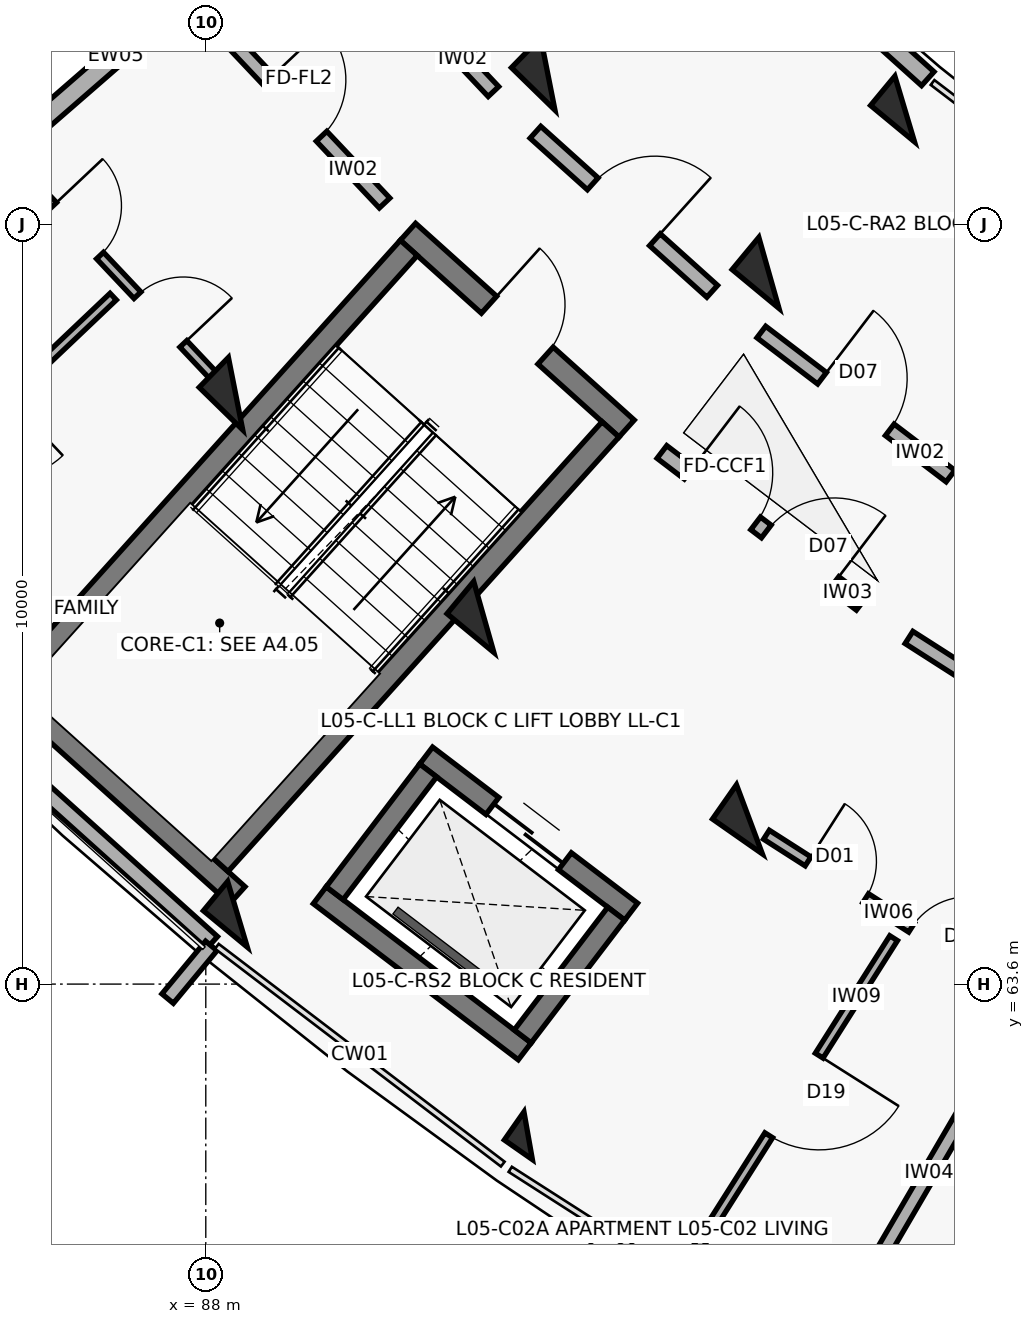
"""IFC4 building model, lengths in metres.
Left out: names, types, materials, properties, quantities, classifications, styles, units other than length and angle.
Written with IfcOpenShell. Run it as: python <this file> out.ifc"""

import sys

from ifc_helpers import new_model, si_unit, direction, frame, frame_2d, origin, origin_2d, place, context, subcontext, project, spatial, rectangle, extrude, element, fill, save


model = new_model("IFC4")
c1 = context("Model", 3, precision=1e-05, world=origin(), true_north=direction((0.0, 1.0)))
c2 = subcontext(c1, "Body", "Model", "MODEL_VIEW")
j1 = project(units=[si_unit("LENGTHUNIT", "METRE"), si_unit("PLANEANGLEUNIT", "RADIAN")], contexts=[c1])
p1 = place(None, origin())
s1 = spatial("IfcSite", under=j1, at=p1, CompositionType="ELEMENT")
p2 = place(p1, origin())
s2 = spatial("IfcBuilding", under=s1, at=p2, CompositionType="ELEMENT")
p3 = place(p2, frame((0.0, 0.0, 17.4)))
s3 = spatial("IfcBuildingStorey", under=s2, at=p3, CompositionType="ELEMENT", Elevation=17.4)
for number, where, z_axis, x_axis in (
    (1, (92.5, 75.576, 0.0), (0.0, 0.0, 1.0), (-0.699, -0.715, 0.0)),
    (2, (88.392, 71.369, 0.0), (0.0, 0.0, 1.0), (-0.699, -0.715, 0.0)),
):
    element("IfcColumn", number, at=place(p3, frame(where, z_axis=z_axis, x_axis=x_axis)), inside=s3, PredefinedType="COLUMN", context=c2, shape_type="SweptSolid", body=[
        extrude(rectangle(XDim=0.55, YDim=0.8, at=origin_2d()), origin(), (0.0, 0.0, 1.0), 3.1),
    ])
p4 = place(p3, frame((97.195, 75.115, 0.0), z_axis=(0.0, 0.0, 1.0), x_axis=(-0.637961754089, -0.770068049148, 0.0)))
e3 = element("IfcColumn", 3, at=p4, inside=s3, PredefinedType="COLUMN", context=c2, shape_type="SweptSolid", body=[
    extrude(rectangle(XDim=0.5, YDim=0.75, at=origin_2d()), origin(), (0.0, 0.0, 1.0), 3.1),
])
for number, where, z_axis, x_axis in (
    (4, (95.409, 72.958, 0.0), (0.0, 0.0, 1.0), (-0.638, -0.77, 0.0)),
    (5, (91.658, 68.43, 0.0), (0.0, 0.0, 1.0), (-0.638, -0.77, 0.0)),
):
    element("IfcColumn", number, at=place(p3, frame(where, z_axis=z_axis, x_axis=x_axis)), inside=s3, PredefinedType="COLUMN", context=c2, shape_type="SweptSolid", body=[
        extrude(rectangle(XDim=0.55, YDim=0.8, at=origin_2d()), origin(), (0.0, 0.0, 1.0), 3.1),
    ])
p5 = place(p3, frame((88.417, 64.518, 0.0), z_axis=(0.0, 0.0, 1.0), x_axis=(-0.637961754089, -0.770068049148, 0.0)))
e6 = element("IfcColumn", 6, at=p5, inside=s3, PredefinedType="COLUMN", context=c2, shape_type="SweptSolid", body=[
    extrude(rectangle(XDim=0.5, YDim=0.75, at=origin_2d()), origin(), (0.0, 0.0, 1.0), 3.1),
])
p6 = place(p3, frame((95.152, 65.768, 0.0), z_axis=(0.0, 0.0, 1.0), x_axis=(-0.573004420611, -0.819552276527, 0.0)))
e7 = element("IfcColumn", 7, at=p6, inside=s3, PredefinedType="COLUMN", context=c2, shape_type="SweptSolid", body=[
    extrude(rectangle(XDim=0.55, YDim=0.8, at=origin_2d()), origin(), (0.0, 0.0, 1.0), 3.1),
])
p7 = place(p3, frame((92.241, 61.605, 0.0), z_axis=(0.0, 0.0, 1.0), x_axis=(-0.573004420611, -0.819552276527, 0.0)))
e8 = element("IfcColumn", 8, at=p7, inside=s3, PredefinedType="COLUMN", context=c2, shape_type="SweptSolid", body=[
    extrude(rectangle(XDim=0.45, YDim=0.45, at=origin_2d()), origin(), (0.0, 0.0, 1.0), 3.1),
])
p8 = place(p3, frame((84.508, 67.363, 0.0), z_axis=(0.0, 0.0, 1.0), x_axis=(0.743387539862, -0.668860946369, 0.0)))
e9 = element("IfcWall", 9, at=p8, inside=s3, PredefinedType="SOLIDWALL", context=c2, shape_type="SweptSolid", body=[
    extrude(rectangle(XDim=4.809, YDim=0.212, at=frame_2d((2.405, 0.0))), origin(), (0.0, 0.0, 1.0), 2.25),
])
p9 = place(p3, frame((94.82, 77.923, 0.0), z_axis=(0.0, 0.0, 1.0), x_axis=(0.743385092197, -0.668863666751, 0.0)))
e10 = element("IfcWall", 10, at=p9, inside=s3, PredefinedType="SOLIDWALL", context=c2, shape_type="SweptSolid", body=[
    extrude(rectangle(XDim=3.604, YDim=0.245, at=frame_2d((1.802, 0.0))), origin(), (0.0, 0.0, 1.0), 2.25),
])
p10 = place(p9, frame((1.002, 0.0, 0.32)))
e11 = element("IfcOpeningElement", 11, at=p10, cuts=e10, PredefinedType="OPENING", context=c2, shape_type="SweptSolid", body=[
    extrude(rectangle(XDim=1.6, YDim=1.5, at=frame_2d((0.8, 0.75))), frame((0.0, 0.133, 0.0), z_axis=(0.0, -1.0, 0.0), x_axis=(1.0, 0.0, 0.0)), (0.0, 0.0, 1.0), 0.265),
])
p11 = place(p3, frame((88.072, 64.103, 0.0), z_axis=(0.0, 0.0, 1.0), x_axis=(-0.637967316825, -0.770063440674, 0.0)))
e12 = element("IfcWall", 12, at=p11, inside=s3, PredefinedType="PARAPET", context=c2, shape_type="SweptSolid", body=[
    extrude(rectangle(XDim=0.9, YDim=0.195, at=frame_2d((0.45, 0.0))), origin(), (0.0, 0.0, 1.0), 2.25),
])
p12 = place(p3, frame((91.746, 80.101, 0.0), z_axis=(0.0, 0.0, 1.0), x_axis=(-0.754704866158, -0.656064451862, 0.0)))
e13 = element("IfcWall", 13, at=p12, inside=s3, PredefinedType="SOLIDWALL", context=c2, shape_type="SweptSolid", body=[
    extrude(rectangle(XDim=8.2, YDim=0.265, at=frame_2d((4.1, 0.0))), origin(), (0.0, 0.0, 1.0), 2.18),
])
p13 = place(p12, frame((3.59, 0.0, 0.75)))
e14 = element("IfcOpeningElement", 14, at=p13, cuts=e13, PredefinedType="OPENING", context=c2, shape_type="SweptSolid", body=[
    extrude(rectangle(XDim=1.35, YDim=1.35, at=frame_2d((0.675, 0.675))), frame((0.0, 0.142, 0.0), z_axis=(0.0, -1.0, 0.0), x_axis=(1.0, 0.0, 0.0)), (0.0, 0.0, 1.0), 0.285),
])
p14 = place(p3, frame((90.66, 73.499, 0.0), z_axis=(0.0, 0.0, 1.0), x_axis=(0.743375696158, -0.668874109501, 0.0)))
e15 = element("IfcWall", 15, at=p14, inside=s3, PredefinedType="SHEAR", context=c2, shape_type="SweptSolid", body=[
    extrude(rectangle(XDim=3.87, YDim=0.3, at=frame_2d((1.935, 0.0))), origin(), (0.0, 0.0, 1.0), 3.1),
])
p15 = place(p14, frame((1.435, 0.0, 0.0)))
e16 = element("IfcOpeningElement", 16, at=p15, cuts=e15, PredefinedType="OPENING", context=c2, shape_type="SweptSolid", body=[
    extrude(rectangle(XDim=1.0, YDim=2.15, at=frame_2d((0.5, 1.075))), frame((0.0, 0.16, 0.0), z_axis=(0.0, -1.0, 0.0), x_axis=(1.0, 0.0, 0.0)), (0.0, 0.0, 1.0), 0.32),
])
p16 = place(p3, frame((85.093, 67.76, 0.0), z_axis=(0.0, 0.0, 1.0), x_axis=(0.743372896184, -0.668877221333, 0.0)))
e17 = element("IfcWall", 17, at=p16, inside=s3, PredefinedType="SHEAR", context=c2, shape_type="SweptSolid", body=[
    extrude(rectangle(XDim=4.47, YDim=0.3, at=frame_2d((2.235, 0.0))), origin(), (0.0, 0.0, 1.0), 3.1),
])
p17 = place(p3, frame((90.671, 73.287, 0.0), z_axis=(0.0, 0.0, 1.0), x_axis=(-0.668885797871, -0.743365179038, 0.0)))
e18 = element("IfcWall", 18, at=p17, inside=s3, PredefinedType="SHEAR", context=c2, shape_type="SweptSolid", body=[
    extrude(rectangle(XDim=7.69, YDim=0.3, at=frame_2d((3.845, 0.0))), origin(), (0.0, 0.0, 1.0), 3.1),
])
p18 = place(p3, frame((93.325, 70.899, 0.0), z_axis=(0.0, 0.0, 1.0), x_axis=(-0.668868253964, -0.743380964808, 0.0)))
e19 = element("IfcWall", 19, at=p18, inside=s3, PredefinedType="SHEAR", context=c2, shape_type="SweptSolid", body=[
    extrude(rectangle(XDim=7.69, YDim=0.3, at=frame_2d((3.845, 0.0))), origin(), (0.0, 0.0, 1.0), 3.1),
])
p19 = place(p3, frame((90.899, 66.607, 0.0), z_axis=(0.0, 0.0, 1.0), x_axis=(0.795439986025, -0.606032365994, 0.0)))
e20 = element("IfcWall", 20, at=p19, inside=s3, PredefinedType="SHEAR", context=c2, shape_type="SweptSolid", body=[
    extrude(rectangle(XDim=3.39, YDim=0.28, at=frame_2d((1.695, 0.0))), origin(), (0.0, 0.0, 1.0), 3.1),
])
p20 = place(p19, frame((1.095, 0.0, 0.0)))
e21 = element("IfcOpeningElement", 21, at=p20, cuts=e20, PredefinedType="OPENING", context=c2, shape_type="SweptSolid", body=[
    extrude(rectangle(XDim=1.2, YDim=2.15, at=frame_2d((0.6, 1.075))), frame((0.0, 0.15, 0.0), z_axis=(0.0, -1.0, 0.0), x_axis=(1.0, 0.0, 0.0)), (0.0, 0.0, 1.0), 0.3),
])
p21 = place(p3, frame((89.5, 64.77, 0.0), z_axis=(0.0, 0.0, 1.0), x_axis=(0.795474703455, -0.605986795371, 0.0)))
e22 = element("IfcWall", 22, at=p21, inside=s3, PredefinedType="SHEAR", context=c2, shape_type="SweptSolid", body=[
    extrude(rectangle(XDim=3.39, YDim=0.28, at=frame_2d((1.695, 0.0))), origin(), (0.0, 0.0, 1.0), 3.1),
])
p22 = place(p3, frame((90.926, 66.411, 0.0), z_axis=(0.0, 0.0, 1.0), x_axis=(-0.605948992168, -0.795503500238, 0.0)))
e23 = element("IfcWall", 23, at=p22, inside=s3, PredefinedType="SHEAR", context=c2, shape_type="SweptSolid", body=[
    extrude(rectangle(XDim=2.03, YDim=0.28, at=frame_2d((1.015, 0.0))), origin(), (0.0, 0.0, 1.0), 3.1),
])
p23 = place(p3, frame((93.4, 64.526, 0.0), z_axis=(0.0, 0.0, 1.0), x_axis=(-0.605891019062, -0.795547656033, 0.0)))
e24 = element("IfcWall", 24, at=p23, inside=s3, PredefinedType="SHEAR", context=c2, shape_type="SweptSolid", body=[
    extrude(rectangle(XDim=2.03, YDim=0.28, at=frame_2d((1.015, 0.0))), origin(), (0.0, 0.0, 1.0), 3.1),
])
p24 = place(p3, frame((87.994, 76.376, 0.0), z_axis=(0.0, 0.0, 1.0), x_axis=(0.686310507227, -0.727308660522, 0.0)))
e25 = element("IfcWall", 25, at=p24, inside=s3, PredefinedType="SOLIDWALL", context=c2, shape_type="SweptSolid", body=[
    extrude(rectangle(XDim=3.436, YDim=0.19, at=frame_2d((1.718, 0.0))), origin(), (0.0, 0.0, 1.0), 2.08),
])
p25 = place(p24, frame((1.208, 0.0, 0.0)))
e26 = element("IfcOpeningElement", 26, at=p25, cuts=e25, PredefinedType="OPENING", context=c2, shape_type="SweptSolid", body=[
    extrude(rectangle(XDim=1.02, YDim=2.15, at=frame_2d((0.51, 1.075))), frame((0.0, 0.105, 0.0), z_axis=(0.0, -1.0, 0.0), x_axis=(1.0, 0.0, 0.0)), (0.0, 0.0, 1.0), 0.21),
])
p26 = place(p3, frame((89.541, 77.721, 0.0), z_axis=(0.0, 0.0, 1.0), x_axis=(0.686344941052, -0.727276166179, 0.0)))
e27 = element("IfcWall", 27, at=p26, inside=s3, PredefinedType="SOLIDWALL", context=c2, shape_type="SweptSolid", body=[
    extrude(rectangle(XDim=3.269, YDim=0.19, at=frame_2d((1.634, 0.0))), origin(), (0.0, 0.0, 1.0), 2.08),
])
p27 = place(p26, frame((1.174, 0.0, 0.0)))
e28 = element("IfcOpeningElement", 28, at=p27, cuts=e27, PredefinedType="OPENING", context=c2, shape_type="SweptSolid", body=[
    extrude(rectangle(XDim=0.92, YDim=2.1, at=frame_2d((0.46, 1.05))), frame((0.0, 0.105, 0.0), z_axis=(0.0, -1.0, 0.0), x_axis=(1.0, 0.0, 0.0)), (0.0, 0.0, 1.0), 0.21),
])
p28 = place(p3, frame((85.545, 74.313, 0.0), z_axis=(0.0, 0.0, 1.0), x_axis=(0.686332741542, -0.727287678906, 0.0)))
e29 = element("IfcWall", 29, at=p28, inside=s3, PredefinedType="PARTITIONING", context=c2, shape_type="SweptSolid", body=[
    extrude(rectangle(XDim=3.797, YDim=0.125, at=frame_2d((1.899, 0.0))), origin(), (0.0, 0.0, 1.0), 2.08),
])
p29 = place(p28, frame((0.65, 0.0, 0.0)))
e30 = element("IfcOpeningElement", 30, at=p29, cuts=e29, PredefinedType="OPENING", context=c2, shape_type="SweptSolid", body=[
    extrude(rectangle(XDim=0.9, YDim=2.1, at=frame_2d((0.45, 1.05))), frame((0.0, 0.073, 0.0), z_axis=(0.0, -1.0, 0.0), x_axis=(1.0, 0.0, 0.0)), (0.0, 0.0, 1.0), 0.145),
])
p30 = place(p28, frame((2.267, 0.0, 0.0)))
e31 = element("IfcOpeningElement", 31, at=p30, cuts=e29, PredefinedType="OPENING", context=c2, shape_type="SweptSolid", body=[
    extrude(rectangle(XDim=0.88, YDim=2.1, at=frame_2d((0.44, 1.05))), frame((0.0, 0.073, 0.0), z_axis=(0.0, -1.0, 0.0), x_axis=(1.0, 0.0, 0.0)), (0.0, 0.0, 1.0), 0.145),
])
p31 = place(p3, frame((86.782, 72.646, 0.0), z_axis=(0.0, 0.0, 1.0), x_axis=(-0.725204659953, -0.688533369694, 0.0)))
e32 = element("IfcWall", 32, at=p31, inside=s3, PredefinedType="PARTITIONING", context=c2, shape_type="SweptSolid", body=[
    extrude(rectangle(XDim=4.9, YDim=0.12, at=frame_2d((2.45, 0.0))), origin(), (0.0, 0.0, 1.0), 2.08),
])
p32 = place(p31, frame((1.92, 0.0, 0.0)))
e33 = element("IfcOpeningElement", 33, at=p32, cuts=e32, PredefinedType="OPENING", context=c2, shape_type="SweptSolid", body=[
    extrude(rectangle(XDim=1.06, YDim=2.1, at=frame_2d((0.53, 1.05))), frame((0.0, 0.07, 0.0), z_axis=(0.0, -1.0, 0.0), x_axis=(1.0, 0.0, 0.0)), (0.0, 0.0, 1.0), 0.14),
])
p33 = place(p3, frame((92.337, 74.808, 0.0), z_axis=(0.0, 0.0, 1.0), x_axis=(0.743348465558, -0.668904371904, 0.0)))
e34 = element("IfcWall", 34, at=p33, inside=s3, PredefinedType="SOLIDWALL", context=c2, shape_type="SweptSolid", body=[
    extrude(rectangle(XDim=3.129, YDim=0.21, at=frame_2d((1.564, 0.0))), origin(), (0.0, 0.0, 1.0), 2.08),
])
p34 = place(p33, frame((1.014, 0.0, 0.0)))
e35 = element("IfcOpeningElement", 35, at=p34, cuts=e34, PredefinedType="OPENING", context=c2, shape_type="SweptSolid", body=[
    extrude(rectangle(XDim=1.1, YDim=2.15, at=frame_2d((0.55, 1.075))), frame((0.0, 0.115, 0.0), z_axis=(0.0, -1.0, 0.0), x_axis=(1.0, 0.0, 0.0)), (0.0, 0.0, 1.0), 0.23),
])
p35 = place(p3, frame((94.001, 70.602, 0.0), z_axis=(0.0, 0.0, 1.0), x_axis=(0.795498026433, -0.605956178235, 0.0)))
e36 = element("IfcWall", 36, at=p35, inside=s3, PredefinedType="SOLIDWALL", context=c2, shape_type="SweptSolid", body=[
    extrude(rectangle(XDim=3.296, YDim=0.21, at=frame_2d((1.648, 0.0))), origin(), (0.0, 0.0, 1.0), 2.08),
])
p36 = place(p35, frame((0.45, 0.0, 0.0)))
e37 = element("IfcOpeningElement", 37, at=p36, cuts=e36, PredefinedType="OPENING", context=c2, shape_type="SweptSolid", body=[
    extrude(rectangle(XDim=1.1, YDim=2.15, at=frame_2d((0.55, 1.075))), frame((0.0, 0.115, 0.0), z_axis=(0.0, -1.0, 0.0), x_axis=(1.0, 0.0, 0.0)), (0.0, 0.0, 1.0), 0.23),
])
p37 = place(p35, frame((1.726, 0.0, 0.0)))
e38 = element("IfcOpeningElement", 38, at=p37, cuts=e36, PredefinedType="OPENING", context=c2, shape_type="SweptSolid", body=[
    extrude(rectangle(XDim=1.12, YDim=2.15, at=frame_2d((0.56, 1.075))), frame((0.0, 0.115, 0.0), z_axis=(0.0, -1.0, 0.0), x_axis=(1.0, 0.0, 0.0)), (0.0, 0.0, 1.0), 0.23),
])
p38 = place(p3, frame((95.309, 72.18, 0.0), z_axis=(0.0, 0.0, 1.0), x_axis=(0.795463961918, -0.606000895453, 0.0)))
e39 = element("IfcWall", 39, at=p38, inside=s3, PredefinedType="SOLIDWALL", context=c2, shape_type="SweptSolid", body=[
    extrude(rectangle(XDim=3.129, YDim=0.19, at=frame_2d((1.564, 0.0))), origin(), (0.0, 0.0, 1.0), 2.08),
])
p39 = place(p38, frame((1.004, 0.0, 0.0)))
e40 = element("IfcOpeningElement", 40, at=p39, cuts=e39, PredefinedType="OPENING", context=c2, shape_type="SweptSolid", body=[
    extrude(rectangle(XDim=1.12, YDim=2.15, at=frame_2d((0.56, 1.075))), frame((0.0, 0.105, 0.0), z_axis=(0.0, -1.0, 0.0), x_axis=(1.0, 0.0, 0.0)), (0.0, 0.0, 1.0), 0.21),
])
p40 = place(p3, frame((97.252, 68.161, 0.0), z_axis=(0.0, 0.0, 1.0), x_axis=(0.842289466461, -0.53902546757, 0.0)))
e41 = element("IfcWall", 41, at=p40, inside=s3, PredefinedType="SOLIDWALL", context=c2, shape_type="SweptSolid", body=[
    extrude(rectangle(XDim=3.436, YDim=0.19, at=frame_2d((1.718, 0.0))), origin(), (0.0, 0.0, 1.0), 2.08),
])
p41 = place(p40, frame((1.228, 0.0, 0.0)))
e42 = element("IfcOpeningElement", 42, at=p41, cuts=e41, PredefinedType="OPENING", context=c2, shape_type="SweptSolid", body=[
    extrude(rectangle(XDim=0.98, YDim=2.15, at=frame_2d((0.49, 1.075))), frame((0.0, 0.105, 0.0), z_axis=(0.0, -1.0, 0.0), x_axis=(1.0, 0.0, 0.0)), (0.0, 0.0, 1.0), 0.21),
])
p42 = place(p3, frame((95.376, 65.565, 0.0), z_axis=(0.0, 0.0, 1.0), x_axis=(0.842242208372, -0.539099306656, 0.0)))
e43 = element("IfcWall", 43, at=p42, inside=s3, PredefinedType="PARTITIONING", context=c2, shape_type="SweptSolid", body=[
    extrude(rectangle(XDim=3.797, YDim=0.14, at=frame_2d((1.899, 0.0))), origin(), (0.0, 0.0, 1.0), 2.08),
])
p43 = place(p42, frame((0.65, 0.0, 0.0)))
e44 = element("IfcOpeningElement", 44, at=p43, cuts=e43, PredefinedType="OPENING", context=c2, shape_type="SweptSolid", body=[
    extrude(rectangle(XDim=0.9, YDim=2.1, at=frame_2d((0.45, 1.05))), frame((0.0, 0.08, 0.0), z_axis=(0.0, -1.0, 0.0), x_axis=(1.0, 0.0, 0.0)), (0.0, 0.0, 1.0), 0.16),
])
p44 = place(p42, frame((2.267, 0.0, 0.0)))
e45 = element("IfcOpeningElement", 45, at=p44, cuts=e43, PredefinedType="OPENING", context=c2, shape_type="SweptSolid", body=[
    extrude(rectangle(XDim=0.88, YDim=2.1, at=frame_2d((0.44, 1.05))), frame((0.0, 0.08, 0.0), z_axis=(0.0, -1.0, 0.0), x_axis=(1.0, 0.0, 0.0)), (0.0, 0.0, 1.0), 0.16),
])
p45 = place(p3, frame((97.05, 64.204, 0.0), z_axis=(0.0, 0.0, 1.0), x_axis=(-0.535246458955, -0.844695938297, 0.0)))
e46 = element("IfcWall", 46, at=p45, inside=s3, PredefinedType="PARTITIONING", context=c2, shape_type="SweptSolid", body=[
    extrude(rectangle(XDim=4.9, YDim=0.12, at=frame_2d((2.45, 0.0))), origin(), (0.0, 0.0, 1.0), 2.08),
])
p46 = place(p45, frame((1.83, 0.0, 0.0)))
e47 = element("IfcOpeningElement", 47, at=p46, cuts=e46, PredefinedType="OPENING", context=c2, shape_type="SweptSolid", body=[
    extrude(rectangle(XDim=1.24, YDim=2.1, at=frame_2d((0.62, 1.05))), frame((0.0, 0.07, 0.0), z_axis=(0.0, -1.0, 0.0), x_axis=(1.0, 0.0, 0.0)), (0.0, 0.0, 1.0), 0.14),
])
p47 = place(p3, frame((98.601, 62.968, 0.0), z_axis=(0.0, 0.0, 1.0), x_axis=(-0.504216452091, -0.863577309475, 0.0)))
e48 = element("IfcWall", 48, at=p47, inside=s3, PredefinedType="SOLIDWALL", context=c2, shape_type="SweptSolid", body=[
    extrude(rectangle(XDim=4.35, YDim=0.185, at=frame_2d((2.175, 0.0))), origin(), (0.0, 0.0, 1.0), 2.08),
])
p48 = place(p15, origin())
e49 = element("IfcDoor", 49, at=p48, inside=s3, OperationType="SINGLE_SWING_LEFT", PredefinedType="DOOR", context=c2, shape_type="SweptSolid", body=[
    extrude(rectangle(XDim=1.0, YDim=2.15, at=frame_2d((0.5, 1.075))), frame((0.0, 0.025, 0.0), z_axis=(0.0, -1.0, 0.0), x_axis=(1.0, 0.0, 0.0)), (0.0, 0.0, 1.0), 0.05),
])
fill(e16, e49)
p49 = place(p20, origin())
e50 = element("IfcDoor", 50, at=p49, inside=s3, OperationType="DOUBLE_DOOR_SLIDING", PredefinedType="DOOR", context=c2, shape_type="SweptSolid", body=[
    extrude(rectangle(XDim=1.2, YDim=2.15, at=frame_2d((0.6, 1.075))), frame((0.0, 0.025, 0.0), z_axis=(0.0, -1.0, 0.0), x_axis=(1.0, 0.0, 0.0)), (0.0, 0.0, 1.0), 0.05),
])
fill(e21, e50)
p50 = place(p25, origin())
e51 = element("IfcDoor", 51, at=p50, inside=s3, OperationType="SINGLE_SWING_LEFT", PredefinedType="DOOR", context=c2, shape_type="SweptSolid", body=[
    extrude(rectangle(XDim=1.02, YDim=2.15, at=frame_2d((0.51, 1.075))), frame((0.0, 0.025, 0.0), z_axis=(0.0, -1.0, 0.0), x_axis=(1.0, 0.0, 0.0)), (0.0, 0.0, 1.0), 0.05),
])
fill(e26, e51)
p51 = place(p29, origin())
e52 = element("IfcDoor", 52, at=p51, inside=s3, OperationType="SINGLE_SWING_LEFT", PredefinedType="DOOR", context=c2, shape_type="SweptSolid", body=[
    extrude(rectangle(XDim=0.9, YDim=2.1, at=frame_2d((0.45, 1.05))), frame((0.0, 0.025, 0.0), z_axis=(0.0, -1.0, 0.0), x_axis=(1.0, 0.0, 0.0)), (0.0, 0.0, 1.0), 0.05),
])
fill(e30, e52)
p52 = place(p30, origin())
e53 = element("IfcDoor", 53, at=p52, inside=s3, OperationType="SINGLE_SWING_RIGHT", PredefinedType="DOOR", context=c2, shape_type="SweptSolid", body=[
    extrude(rectangle(XDim=0.88, YDim=2.1, at=frame_2d((0.44, 1.05))), frame((0.0, 0.025, 0.0), z_axis=(0.0, -1.0, 0.0), x_axis=(1.0, 0.0, 0.0)), (0.0, 0.0, 1.0), 0.05),
])
fill(e31, e53)
p53 = place(p34, origin())
e54 = element("IfcDoor", 54, at=p53, inside=s3, OperationType="SINGLE_SWING_RIGHT", PredefinedType="DOOR", context=c2, shape_type="SweptSolid", body=[
    extrude(rectangle(XDim=1.1, YDim=2.15, at=frame_2d((0.55, 1.075))), frame((0.0, 0.025, 0.0), z_axis=(0.0, -1.0, 0.0), x_axis=(1.0, 0.0, 0.0)), (0.0, 0.0, 1.0), 0.05),
])
fill(e35, e54)
p54 = place(p36, origin())
e55 = element("IfcDoor", 55, at=p54, inside=s3, OperationType="SINGLE_SWING_LEFT", PredefinedType="DOOR", context=c2, shape_type="SweptSolid", body=[
    extrude(rectangle(XDim=1.1, YDim=2.15, at=frame_2d((0.55, 1.075))), frame((0.0, 0.025, 0.0), z_axis=(0.0, -1.0, 0.0), x_axis=(1.0, 0.0, 0.0)), (0.0, 0.0, 1.0), 0.05),
])
fill(e37, e55)
p55 = place(p37, origin())
e56 = element("IfcDoor", 56, at=p55, inside=s3, OperationType="SINGLE_SWING_RIGHT", PredefinedType="DOOR", context=c2, shape_type="SweptSolid", body=[
    extrude(rectangle(XDim=1.12, YDim=2.15, at=frame_2d((0.56, 1.075))), frame((0.0, 0.025, 0.0), z_axis=(0.0, -1.0, 0.0), x_axis=(1.0, 0.0, 0.0)), (0.0, 0.0, 1.0), 0.05),
])
fill(e38, e56)
p56 = place(p39, origin())
e57 = element("IfcDoor", 57, at=p56, inside=s3, OperationType="SINGLE_SWING_LEFT", PredefinedType="DOOR", context=c2, shape_type="SweptSolid", body=[
    extrude(rectangle(XDim=1.12, YDim=2.15, at=frame_2d((0.56, 1.075))), frame((0.0, 0.025, 0.0), z_axis=(0.0, -1.0, 0.0), x_axis=(1.0, 0.0, 0.0)), (0.0, 0.0, 1.0), 0.05),
])
fill(e40, e57)
p57 = place(p43, origin())
e58 = element("IfcDoor", 58, at=p57, inside=s3, OperationType="SINGLE_SWING_LEFT", PredefinedType="DOOR", context=c2, shape_type="SweptSolid", body=[
    extrude(rectangle(XDim=0.9, YDim=2.1, at=frame_2d((0.45, 1.05))), frame((0.0, 0.025, 0.0), z_axis=(0.0, -1.0, 0.0), x_axis=(1.0, 0.0, 0.0)), (0.0, 0.0, 1.0), 0.05),
])
fill(e44, e58)
p58 = place(p44, origin())
e59 = element("IfcDoor", 59, at=p58, inside=s3, OperationType="SINGLE_SWING_RIGHT", PredefinedType="DOOR", context=c2, shape_type="SweptSolid", body=[
    extrude(rectangle(XDim=0.88, YDim=2.1, at=frame_2d((0.44, 1.05))), frame((0.0, 0.025, 0.0), z_axis=(0.0, -1.0, 0.0), x_axis=(1.0, 0.0, 0.0)), (0.0, 0.0, 1.0), 0.05),
])
fill(e45, e59)
p59 = place(p46, origin())
e60 = element("IfcDoor", 60, at=p59, inside=s3, OperationType="SINGLE_SWING_LEFT", PredefinedType="DOOR", context=c2, shape_type="SweptSolid", body=[
    extrude(rectangle(XDim=1.24, YDim=2.1, at=frame_2d((0.62, 1.05))), frame((0.0, 0.025, 0.0), z_axis=(0.0, -1.0, 0.0), x_axis=(1.0, 0.0, 0.0)), (0.0, 0.0, 1.0), 0.05),
])
fill(e47, e60)
save(model, sys.argv[1])
